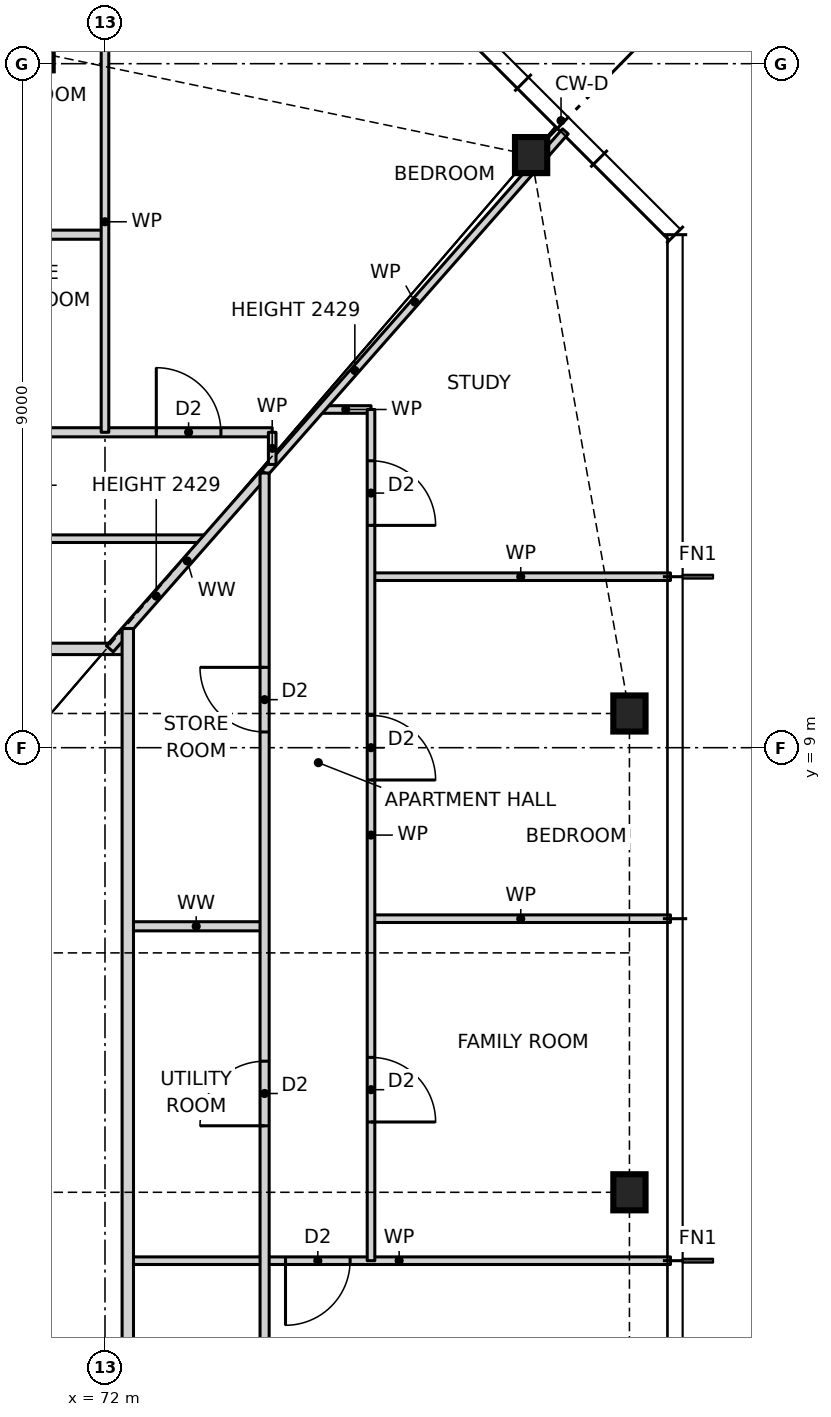
"""IFC4 building model, lengths in metres.
Left out: names, types, materials, properties, quantities, classifications, styles, units other than length and angle.
Written with IfcOpenShell. Run it as: python <this file> out.ifc"""

import sys

from ifc_helpers import new_model, si_unit, direction, frame, frame_2d, origin, origin_2d, place, context, subcontext, project, spatial, rectangle, i_section, extrude, element, fill, save


model = new_model("IFC4")
c1 = context("Model", 3, precision=1e-05, world=origin(), true_north=direction((0.0, 1.0)))
c2 = subcontext(c1, "Body", "Model", "MODEL_VIEW")
j1 = project(units=[si_unit("LENGTHUNIT", "METRE"), si_unit("PLANEANGLEUNIT", "RADIAN")], contexts=[c1])
p1 = place(None, origin())
s1 = spatial("IfcSite", under=j1, at=p1, CompositionType="ELEMENT")
p2 = place(p1, origin())
s2 = spatial("IfcBuilding", under=s1, at=p2, CompositionType="ELEMENT")
p3 = place(p2, frame((0.0, 0.0, 32.5)))
s3 = spatial("IfcBuildingStorey", under=s2, at=p3, CompositionType="ELEMENT", Elevation=32.5)
for number, where, z_axis, x_axis in (
    (1, (78.9, 3.15, 0.0), (0.0, 0.0, 1.0), (1.0, 0.0, 0.0)),
    (2, (78.9, 9.45, 0.0), (0.0, 0.0, 1.0), (1.0, 0.0, 0.0)),
    (3, (77.606, 16.797, 0.0), (0.0, 0.0, 1.0), (1.0, 0.0, 0.0)),
    (4, (71.1, 18.15, 0.0), (0.0, 0.0, 1.0), (1.0, 0.0, 0.0)),
):
    element("IfcColumn", number, at=place(p3, frame(where, z_axis=z_axis, x_axis=x_axis)), inside=s3, PredefinedType="COLUMN", context=c2, shape_type="SweptSolid", body=[
        extrude(i_section(OverallWidth=0.424, OverallDepth=0.475, WebThickness=0.048, FlangeThickness=0.077, at=origin_2d()), origin(), (0.0, 0.0, 1.0), 3.5),
    ])
p4 = place(p3, frame((72.3, 2.25, 0.0), z_axis=(0.0, 0.0, 1.0), x_axis=(1.0, 0.0, 0.0)))
e5 = element("IfcWall", 5, at=p4, inside=s3, PredefinedType="PARTITIONING", context=c2, shape_type="SweptSolid", body=[
    extrude(rectangle(XDim=7.14, YDim=0.1, at=frame_2d((3.57, 0.0))), origin(), (0.0, 0.0, 1.0), 3.27),
])
p5 = place(p4, frame((2.075, 0.0, 0.0)))
e6 = element("IfcOpeningElement", 6, at=p5, cuts=e5, PredefinedType="OPENING", context=c2, shape_type="SweptSolid", body=[
    extrude(rectangle(XDim=0.85, YDim=2.1, at=frame_2d((0.425, 1.05))), frame((0.0, 0.06, 0.0), z_axis=(0.0, -1.0, 0.0), x_axis=(1.0, 0.0, 0.0)), (0.0, 0.0, 1.0), 0.12),
])
p6 = place(p3, frame((72.3, 6.65, 0.0), z_axis=(0.0, 0.0, 1.0), x_axis=(1.0, 0.0, 0.0)))
e7 = element("IfcWall", 7, at=p6, inside=s3, PredefinedType="PARTITIONING", context=c2, shape_type="SweptSolid", body=[
    extrude(rectangle(XDim=1.8, YDim=0.12, at=frame_2d((0.9, 0.0))), origin(), (0.0, 0.0, 1.0), 3.27),
])
p7 = place(p3, frame((75.5, 6.75, 0.0), z_axis=(0.0, 0.0, 1.0), x_axis=(1.0, 0.0, 0.0)))
e8 = element("IfcWall", 8, at=p7, inside=s3, PredefinedType="PARTITIONING", context=c2, shape_type="SweptSolid", body=[
    extrude(rectangle(XDim=3.94, YDim=0.1, at=frame_2d((1.97, 0.0))), origin(), (0.0, 0.0, 1.0), 3.27),
])
p8 = place(p3, frame((53.7, 10.3, 0.0), z_axis=(0.0, 0.0, 1.0), x_axis=(1.0, 0.0, 0.0)))
e9 = element("IfcWall", 9, at=p8, inside=s3, PredefinedType="PARTITIONING", context=c2, shape_type="SweptSolid", body=[
    extrude(rectangle(XDim=18.6, YDim=0.15, at=frame_2d((9.3, 0.0))), origin(), (0.0, 0.0, 1.0), 3.27),
])
p9 = place(p8, frame((8.3, 0.0, 0.0)))
e10 = element("IfcOpeningElement", 10, at=p9, cuts=e9, PredefinedType="OPENING", context=c2, shape_type="SweptSolid", body=[
    extrude(rectangle(XDim=1.0, YDim=2.1, at=frame_2d((0.5, 1.05))), frame((0.0, 0.085, 0.0), z_axis=(0.0, -1.0, 0.0), x_axis=(1.0, 0.0, 0.0)), (0.0, 0.0, 1.0), 0.17),
])
p10 = place(p3, frame((75.5, 11.25, 0.0), z_axis=(0.0, 0.0, 1.0), x_axis=(1.0, 0.0, 0.0)))
e11 = element("IfcWall", 11, at=p10, inside=s3, PredefinedType="PARTITIONING", context=c2, shape_type="SweptSolid", body=[
    extrude(rectangle(XDim=3.94, YDim=0.1, at=frame_2d((1.97, 0.0))), origin(), (0.0, 0.0, 1.0), 3.27),
])
p11 = place(p3, frame((52.66, 11.75, 0.0), z_axis=(0.0, 0.0, 1.0), x_axis=(1.0, 0.0, 0.0)))
e12 = element("IfcWall", 12, at=p11, inside=s3, PredefinedType="PARTITIONING", context=c2, shape_type="SweptSolid", body=[
    extrude(rectangle(XDim=20.68, YDim=0.1, at=frame_2d((10.34, 0.0))), origin(), (0.0, 0.0, 1.0), 3.27),
])
p12 = place(p11, frame((12.615, 0.0, 0.0)))
e13 = element("IfcOpeningElement", 13, at=p12, cuts=e12, PredefinedType="OPENING", context=c2, shape_type="SweptSolid", body=[
    extrude(rectangle(XDim=0.85, YDim=2.1, at=frame_2d((0.425, 1.05))), frame((0.0, 0.06, 0.0), z_axis=(0.0, -1.0, 0.0), x_axis=(1.0, 0.0, 0.0)), (0.0, 0.0, 1.0), 0.12),
])
p13 = place(p11, frame((9.415, 0.0, 0.0)))
e14 = element("IfcOpeningElement", 14, at=p13, cuts=e12, PredefinedType="OPENING", context=c2, shape_type="SweptSolid", body=[
    extrude(rectangle(XDim=0.85, YDim=2.1, at=frame_2d((0.425, 1.05))), frame((0.0, 0.06, 0.0), z_axis=(0.0, -1.0, 0.0), x_axis=(1.0, 0.0, 0.0)), (0.0, 0.0, 1.0), 0.12),
])
p14 = place(p11, frame((17.335, 0.0, 0.0)))
e15 = element("IfcOpeningElement", 15, at=p14, cuts=e12, PredefinedType="OPENING", context=c2, shape_type="SweptSolid", body=[
    extrude(rectangle(XDim=0.85, YDim=2.1, at=frame_2d((0.425, 1.05))), frame((0.0, 0.06, 0.0), z_axis=(0.0, -1.0, 0.0), x_axis=(1.0, 0.0, 0.0)), (0.0, 0.0, 1.0), 0.12),
])
p15 = place(p11, frame((2.495, 0.0, 0.0)))
e16 = element("IfcOpeningElement", 16, at=p15, cuts=e12, PredefinedType="OPENING", context=c2, shape_type="SweptSolid", body=[
    extrude(rectangle(XDim=0.85, YDim=2.1, at=frame_2d((0.425, 1.05))), frame((0.0, 0.06, 0.0), z_axis=(0.0, -1.0, 0.0), x_axis=(1.0, 0.0, 0.0)), (0.0, 0.0, 1.0), 0.12),
])
p16 = place(p3, frame((67.5, 13.15, 0.0), z_axis=(0.0, 0.0, 1.0), x_axis=(1.0, 0.0, 0.0)))
e17 = element("IfcWall", 17, at=p16, inside=s3, PredefinedType="PARTITIONING", context=c2, shape_type="SweptSolid", body=[
    extrude(rectangle(XDim=6.7, YDim=0.12, at=frame_2d((3.35, 0.0))), origin(), (0.0, 0.0, 1.0), 3.27),
])
p17 = place(p16, frame((0.625, 0.0, 0.0)))
e18 = element("IfcOpeningElement", 18, at=p17, cuts=e17, PredefinedType="OPENING", context=c2, shape_type="SweptSolid", body=[
    extrude(rectangle(XDim=0.85, YDim=2.1, at=frame_2d((0.425, 1.05))), frame((0.0, 0.07, 0.0), z_axis=(0.0, -1.0, 0.0), x_axis=(1.0, 0.0, 0.0)), (0.0, 0.0, 1.0), 0.14),
])
p18 = place(p16, frame((5.175, 0.0, 0.0)))
e19 = element("IfcOpeningElement", 19, at=p18, cuts=e17, PredefinedType="OPENING", context=c2, shape_type="SweptSolid", body=[
    extrude(rectangle(XDim=0.85, YDim=2.1, at=frame_2d((0.425, 1.05))), frame((0.0, 0.07, 0.0), z_axis=(0.0, -1.0, 0.0), x_axis=(1.0, 0.0, 0.0)), (0.0, 0.0, 1.0), 0.14),
])
p19 = place(p3, frame((74.836, 13.45, 0.0), z_axis=(0.0, 0.0, 1.0), x_axis=(1.0, 0.0, 0.0)))
e20 = element("IfcWall", 20, at=p19, inside=s3, PredefinedType="PARTITIONING", context=c2, shape_type="SweptSolid", body=[
    extrude(rectangle(XDim=0.664, YDim=0.1, at=frame_2d((0.332, 0.0))), origin(), (0.0, 0.0, 1.0), 3.27),
])
p20 = place(p3, frame((69.6, 15.75, 0.0), z_axis=(0.0, 0.0, 1.0), x_axis=(1.0, 0.0, 0.0)))
e21 = element("IfcWall", 21, at=p20, inside=s3, PredefinedType="PARTITIONING", context=c2, shape_type="SweptSolid", body=[
    extrude(rectangle(XDim=2.4, YDim=0.12, at=frame_2d((1.2, 0.0))), origin(), (0.0, 0.0, 1.0), 3.27),
])
p21 = place(p3, frame((74.1, 12.614, 0.0), z_axis=(0.0, 0.0, 1.0), x_axis=(0.660755619739, 0.750601099775, 0.0)))
e22 = element("IfcWall", 22, at=p21, inside=s3, PredefinedType="PARTITIONING", context=c2, shape_type="SweptSolid", body=[
    extrude(rectangle(XDim=5.989, YDim=0.1, at=frame_2d((2.995, 0.0))), origin(), (0.0, 0.0, 1.0), 2.429),
])
p22 = place(p3, frame((72.063, 10.301, 0.0), z_axis=(0.0, 0.0, 1.0), x_axis=(0.660761820138, 0.750595641506, 0.0)))
e23 = element("IfcWall", 23, at=p22, inside=s3, PredefinedType="PARTITIONING", context=c2, shape_type="SweptSolid", body=[
    extrude(rectangle(XDim=3.082, YDim=0.12, at=frame_2d((1.541, 0.0))), origin(), (0.0, 0.0, 1.0), 2.429),
])
p23 = place(p3, frame((75.5, 2.25, 0.0), z_axis=(0.0, 0.0, 1.0), x_axis=(0.0, 1.0, 0.0)))
e24 = element("IfcWall", 24, at=p23, inside=s3, PredefinedType="PARTITIONING", context=c2, shape_type="SweptSolid", body=[
    extrude(rectangle(XDim=11.2, YDim=0.1, at=frame_2d((5.6, 0.0))), origin(), (0.0, 0.0, 1.0), 3.27),
])
p24 = place(p23, frame((1.825, 0.0, 0.0)))
e25 = element("IfcOpeningElement", 25, at=p24, cuts=e24, PredefinedType="OPENING", context=c2, shape_type="SweptSolid", body=[
    extrude(rectangle(XDim=0.85, YDim=2.1, at=frame_2d((0.425, 1.05))), frame((0.0, 0.06, 0.0), z_axis=(0.0, -1.0, 0.0), x_axis=(1.0, 0.0, 0.0)), (0.0, 0.0, 1.0), 0.12),
])
p25 = place(p23, frame((6.325, 0.0, 0.0)))
e26 = element("IfcOpeningElement", 26, at=p25, cuts=e24, PredefinedType="OPENING", context=c2, shape_type="SweptSolid", body=[
    extrude(rectangle(XDim=0.85, YDim=2.1, at=frame_2d((0.425, 1.05))), frame((0.0, 0.06, 0.0), z_axis=(0.0, -1.0, 0.0), x_axis=(1.0, 0.0, 0.0)), (0.0, 0.0, 1.0), 0.12),
])
p26 = place(p23, frame((9.675, 0.0, 0.0)))
e27 = element("IfcOpeningElement", 27, at=p26, cuts=e24, PredefinedType="OPENING", context=c2, shape_type="SweptSolid", body=[
    extrude(rectangle(XDim=0.85, YDim=2.1, at=frame_2d((0.425, 1.05))), frame((0.0, 0.06, 0.0), z_axis=(0.0, -1.0, 0.0), x_axis=(1.0, 0.0, 0.0)), (0.0, 0.0, 1.0), 0.12),
])
p27 = place(p3, frame((74.2, 12.727, 0.0), z_axis=(0.0, 0.0, 1.0), x_axis=(0.0, 1.0, 0.0)))
e28 = element("IfcWall", 28, at=p27, inside=s3, PredefinedType="PARTITIONING", context=c2, shape_type="SweptSolid", body=[
    extrude(rectangle(XDim=0.423, YDim=0.1, at=frame_2d((0.211, 0.0))), origin(), (0.0, 0.0, 1.0), 3.27),
])
p28 = place(p3, frame((74.1, -12.614, 0.0), z_axis=(0.0, 0.0, 1.0), x_axis=(0.0, 1.0, 0.0)))
e29 = element("IfcWall", 29, at=p28, inside=s3, PredefinedType="PARTITIONING", context=c2, shape_type="SweptSolid", body=[
    extrude(rectangle(XDim=25.228, YDim=0.12, at=frame_2d((12.614, 0.0))), origin(), (0.0, 0.0, 1.0), 3.27),
])
p29 = place(p28, frame((7.239, 0.0, 0.0)))
e30 = element("IfcOpeningElement", 30, at=p29, cuts=e29, PredefinedType="OPENING", context=c2, shape_type="SweptSolid", body=[
    extrude(rectangle(XDim=0.85, YDim=2.1, at=frame_2d((0.425, 1.05))), frame((0.0, 0.07, 0.0), z_axis=(0.0, -1.0, 0.0), x_axis=(1.0, 0.0, 0.0)), (0.0, 0.0, 1.0), 0.14),
])
p30 = place(p28, frame((10.439, 0.0, 0.0)))
e31 = element("IfcOpeningElement", 31, at=p30, cuts=e29, PredefinedType="OPENING", context=c2, shape_type="SweptSolid", body=[
    extrude(rectangle(XDim=0.85, YDim=2.1, at=frame_2d((0.425, 1.05))), frame((0.0, 0.07, 0.0), z_axis=(0.0, -1.0, 0.0), x_axis=(1.0, 0.0, 0.0)), (0.0, 0.0, 1.0), 0.14),
])
p31 = place(p28, frame((2.507, 0.0, 0.0)))
e32 = element("IfcOpeningElement", 32, at=p31, cuts=e29, PredefinedType="OPENING", context=c2, shape_type="SweptSolid", body=[
    extrude(rectangle(XDim=0.85, YDim=2.1, at=frame_2d((0.425, 1.05))), frame((0.0, 0.07, 0.0), z_axis=(0.0, -1.0, 0.0), x_axis=(1.0, 0.0, 0.0)), (0.0, 0.0, 1.0), 0.14),
])
p32 = place(p28, frame((16.639, 0.0, 0.0)))
e33 = element("IfcOpeningElement", 33, at=p32, cuts=e29, PredefinedType="OPENING", context=c2, shape_type="SweptSolid", body=[
    extrude(rectangle(XDim=0.85, YDim=2.1, at=frame_2d((0.425, 1.05))), frame((0.0, 0.07, 0.0), z_axis=(0.0, -1.0, 0.0), x_axis=(1.0, 0.0, 0.0)), (0.0, 0.0, 1.0), 0.14),
])
p33 = place(p28, frame((21.821, 0.0, 0.0)))
e34 = element("IfcOpeningElement", 34, at=p33, cuts=e29, PredefinedType="OPENING", context=c2, shape_type="SweptSolid", body=[
    extrude(rectangle(XDim=0.85, YDim=2.1, at=frame_2d((0.425, 1.05))), frame((0.0, 0.07, 0.0), z_axis=(0.0, -1.0, 0.0), x_axis=(1.0, 0.0, 0.0)), (0.0, 0.0, 1.0), 0.14),
])
p34 = place(p3, frame((72.3, -10.568, 0.0), z_axis=(0.0, 0.0, 1.0), x_axis=(0.0, 1.0, 0.0)))
e35 = element("IfcWall", 35, at=p34, inside=s3, PredefinedType="PARTITIONING", context=c2, shape_type="SweptSolid", body=[
    extrude(rectangle(XDim=21.136, YDim=0.15, at=frame_2d((10.568, 0.0))), origin(), (0.0, 0.0, 1.0), 3.27),
])
p35 = place(p34, frame((8.318, 0.0, 0.0)))
e36 = element("IfcOpeningElement", 36, at=p35, cuts=e35, PredefinedType="OPENING", context=c2, shape_type="SweptSolid", body=[
    extrude(rectangle(XDim=1.0, YDim=2.1, at=frame_2d((0.5, 1.05))), frame((0.0, 0.085, 0.0), z_axis=(0.0, -1.0, 0.0), x_axis=(1.0, 0.0, 0.0)), (0.0, 0.0, 1.0), 0.17),
])
p36 = place(p3, frame((72.0, 13.15, 0.0), z_axis=(0.0, 0.0, 1.0), x_axis=(0.0, 1.0, 0.0)))
e37 = element("IfcWall", 37, at=p36, inside=s3, PredefinedType="PARTITIONING", context=c2, shape_type="SweptSolid", body=[
    extrude(rectangle(XDim=5.54, YDim=0.1, at=frame_2d((2.77, 0.0))), origin(), (0.0, 0.0, 1.0), 3.27),
])
p37 = place(p5, frame((0.85, 0.0, 0.0), z_axis=(0.0, 0.0, 1.0), x_axis=(-1.0, 0.0, 0.0)))
e38 = element("IfcDoor", 38, at=p37, inside=s3, OperationType="SINGLE_SWING_RIGHT", PredefinedType="DOOR", context=c2, shape_type="SweptSolid", body=[
    extrude(rectangle(XDim=0.85, YDim=2.1, at=frame_2d((0.425, 1.05))), frame((0.0, 0.025, 0.0), z_axis=(0.0, -1.0, 0.0), x_axis=(1.0, 0.0, 0.0)), (0.0, 0.0, 1.0), 0.05),
])
fill(e6, e38)
p38 = place(p24, frame((0.85, 0.0, 0.0), z_axis=(0.0, 0.0, 1.0), x_axis=(-1.0, 0.0, 0.0)))
e39 = element("IfcDoor", 39, at=p38, inside=s3, OperationType="SINGLE_SWING_RIGHT", PredefinedType="DOOR", context=c2, shape_type="SweptSolid", body=[
    extrude(rectangle(XDim=0.85, YDim=2.1, at=frame_2d((0.425, 1.05))), frame((0.0, 0.025, 0.0), z_axis=(0.0, -1.0, 0.0), x_axis=(1.0, 0.0, 0.0)), (0.0, 0.0, 1.0), 0.05),
])
fill(e25, e39)
p39 = place(p25, frame((0.85, 0.0, 0.0), z_axis=(0.0, 0.0, 1.0), x_axis=(-1.0, 0.0, 0.0)))
e40 = element("IfcDoor", 40, at=p39, inside=s3, OperationType="SINGLE_SWING_RIGHT", PredefinedType="DOOR", context=c2, shape_type="SweptSolid", body=[
    extrude(rectangle(XDim=0.85, YDim=2.1, at=frame_2d((0.425, 1.05))), frame((0.0, 0.025, 0.0), z_axis=(0.0, -1.0, 0.0), x_axis=(1.0, 0.0, 0.0)), (0.0, 0.0, 1.0), 0.05),
])
fill(e26, e40)
p40 = place(p26, frame((0.85, 0.0, 0.0), z_axis=(0.0, 0.0, 1.0), x_axis=(-1.0, 0.0, 0.0)))
e41 = element("IfcDoor", 41, at=p40, inside=s3, OperationType="SINGLE_SWING_RIGHT", PredefinedType="DOOR", context=c2, shape_type="SweptSolid", body=[
    extrude(rectangle(XDim=0.85, YDim=2.1, at=frame_2d((0.425, 1.05))), frame((0.0, 0.025, 0.0), z_axis=(0.0, -1.0, 0.0), x_axis=(1.0, 0.0, 0.0)), (0.0, 0.0, 1.0), 0.05),
])
fill(e27, e41)
p41 = place(p32, origin())
e42 = element("IfcDoor", 42, at=p41, inside=s3, OperationType="SINGLE_SWING_LEFT", PredefinedType="DOOR", context=c2, shape_type="SweptSolid", body=[
    extrude(rectangle(XDim=0.85, YDim=2.1, at=frame_2d((0.425, 1.05))), frame((0.0, 0.025, 0.0), z_axis=(0.0, -1.0, 0.0), x_axis=(1.0, 0.0, 0.0)), (0.0, 0.0, 1.0), 0.05),
])
fill(e33, e42)
p42 = place(p33, origin())
e43 = element("IfcDoor", 43, at=p42, inside=s3, OperationType="SINGLE_SWING_RIGHT", PredefinedType="DOOR", context=c2, shape_type="SweptSolid", body=[
    extrude(rectangle(XDim=0.85, YDim=2.1, at=frame_2d((0.425, 1.05))), frame((0.0, 0.025, 0.0), z_axis=(0.0, -1.0, 0.0), x_axis=(1.0, 0.0, 0.0)), (0.0, 0.0, 1.0), 0.05),
])
fill(e34, e43)
p43 = place(p18, origin())
e44 = element("IfcDoor", 44, at=p43, inside=s3, OperationType="SINGLE_SWING_LEFT", PredefinedType="DOOR", context=c2, shape_type="SweptSolid", body=[
    extrude(rectangle(XDim=0.85, YDim=2.1, at=frame_2d((0.425, 1.05))), frame((0.0, 0.025, 0.0), z_axis=(0.0, -1.0, 0.0), x_axis=(1.0, 0.0, 0.0)), (0.0, 0.0, 1.0), 0.05),
])
fill(e19, e44)
save(model, sys.argv[1])
